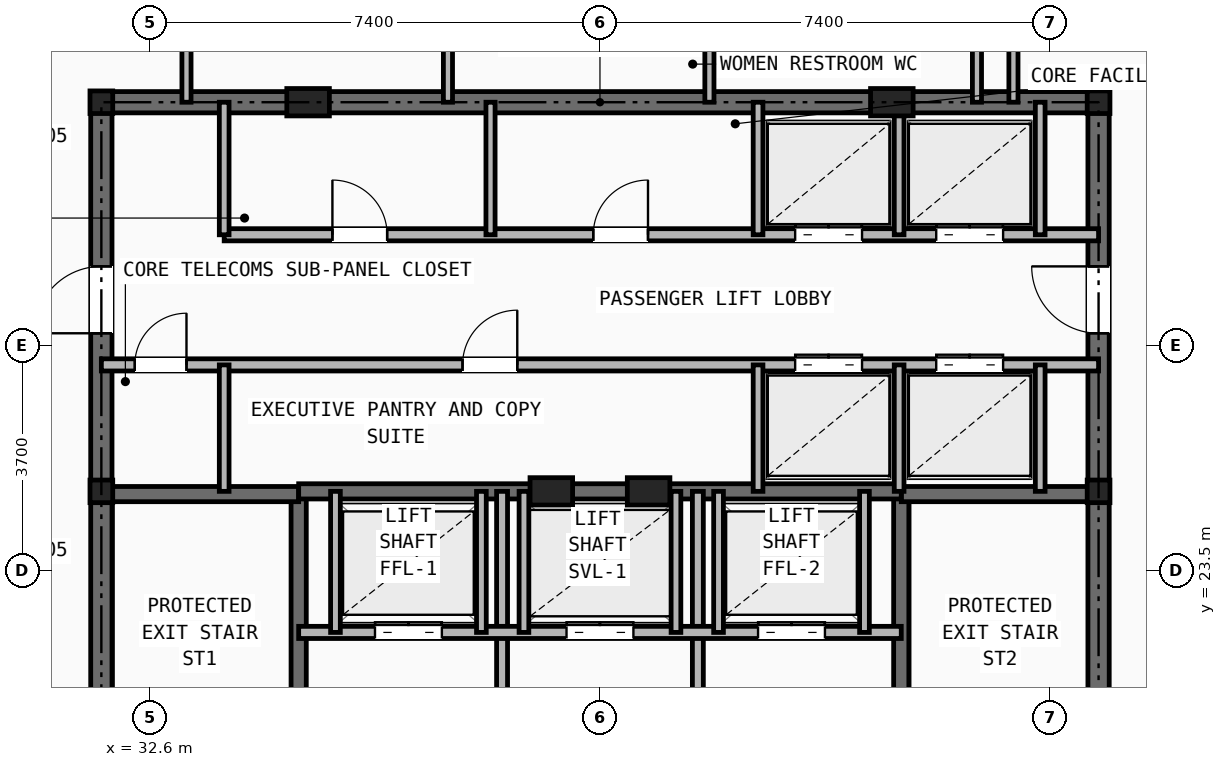
"""IFC4 building model, lengths in metres.
Left out: names, types, materials, properties, quantities, classifications, styles, units other than length and angle.
Written with IfcOpenShell. Run it as: python <this file> out.ifc"""

import sys

from ifc_helpers import new_model, si_unit, direction, frame, frame_2d, origin, origin_2d, place, context, subcontext, project, spatial, rectangle, i_section, extrude, element, fill, save


model = new_model("IFC4")
c1 = context("Model", 3, precision=1e-05, world=origin(), true_north=direction((0.0, 1.0)))
c2 = subcontext(c1, "Body", "Model", "MODEL_VIEW")
j1 = project(units=[si_unit("LENGTHUNIT", "METRE"), si_unit("PLANEANGLEUNIT", "RADIAN")], contexts=[c1])
p1 = place(None, origin())
s1 = spatial("IfcSite", under=j1, at=p1, CompositionType="ELEMENT")
p2 = place(p1, origin())
s2 = spatial("IfcBuilding", under=s1, at=p2, CompositionType="ELEMENT")
p3 = place(p2, frame((0.0, 0.0, 246.9)))
s3 = spatial("IfcBuildingStorey", under=s2, at=p3, CompositionType="ELEMENT", Elevation=246.9)
for number, where, z_axis, x_axis in (
    (1, (31.8, 24.8, 0.0), (0.0, 0.0, 1.0), (1.0, 0.0, 0.0)),
    (2, (48.2, 24.8, 0.0), (0.0, 0.0, 1.0), (1.0, 0.0, 0.0)),
    (3, (31.8, 31.2, 0.0), (0.0, 0.0, 1.0), (1.0, 0.0, 0.0)),
    (4, (48.2, 31.2, 0.0), (0.0, 0.0, 1.0), (1.0, 0.0, 0.0)),
):
    element("IfcColumn", number, at=place(p3, frame(where, z_axis=z_axis, x_axis=x_axis)), inside=s3, PredefinedType="COLUMN", context=c2, shape_type="SweptSolid", body=[
        extrude(i_section(OverallWidth=0.374, OverallDepth=0.372, WebThickness=0.016, FlangeThickness=0.026, at=origin_2d()), origin(), (0.0, 0.0, 1.0), 3.5),
    ])
for number, where, z_axis, x_axis in (
    (5, (35.2, 31.2, 0.0), (0.0, 0.0, 1.0), (1.0, 0.0, 0.0)),
    (6, (44.8, 31.2, 0.0), (0.0, 0.0, 1.0), (1.0, 0.0, 0.0)),
    (7, (39.2, 24.8, 0.0), (0.0, 0.0, 1.0), (1.0, 0.0, 0.0)),
    (8, (40.8, 24.8, 0.0), (0.0, 0.0, 1.0), (1.0, 0.0, 0.0)),
):
    element("IfcColumn", number, at=place(p3, frame(where, z_axis=z_axis, x_axis=x_axis)), inside=s3, PredefinedType="PILASTER", context=c2, shape_type="SweptSolid", body=[
        extrude(rectangle(XDim=0.7, YDim=0.45, at=origin_2d()), origin(), (0.0, 0.0, 1.0), 3.5),
    ])
p4 = place(p3, frame((31.8, 31.2, 0.0), z_axis=(0.0, 0.0, 1.0), x_axis=(1.0, 0.0, 0.0)))
e9 = element("IfcWall", 9, at=p4, inside=s3, PredefinedType="SHEAR", context=c2, shape_type="SweptSolid", body=[
    extrude(rectangle(XDim=16.4, YDim=0.35, at=frame_2d((8.2, 0.0))), origin(), (0.0, 0.0, 1.0), 3.2),
])
p5 = place(p3, frame((31.8, 16.4, 0.0), z_axis=(0.0, 0.0, 1.0), x_axis=(0.0, 1.0, 0.0)))
e10 = element("IfcWall", 10, at=p5, inside=s3, PredefinedType="SHEAR", context=c2, shape_type="SweptSolid", body=[
    extrude(rectangle(XDim=14.8, YDim=0.35, at=frame_2d((7.4, 0.0))), origin(), (0.0, 0.0, 1.0), 3.2),
])
p6 = place(p5, frame((11.0, 0.0, 0.0)))
e11 = element("IfcOpeningElement", 11, at=p6, cuts=e10, PredefinedType="OPENING", context=c2, shape_type="SweptSolid", body=[
    extrude(rectangle(XDim=1.1, YDim=2.15, at=frame_2d((0.55, 1.075))), frame((0.0, 0.185, 0.0), z_axis=(0.0, -1.0, 0.0), x_axis=(1.0, 0.0, 0.0)), (0.0, 0.0, 1.0), 0.37),
])
p7 = place(p3, frame((48.2, 16.4, 0.0), z_axis=(0.0, 0.0, 1.0), x_axis=(0.0, 1.0, 0.0)))
e12 = element("IfcWall", 12, at=p7, inside=s3, PredefinedType="SHEAR", context=c2, shape_type="SweptSolid", body=[
    extrude(rectangle(XDim=14.8, YDim=0.35, at=frame_2d((7.4, 0.0))), origin(), (0.0, 0.0, 1.0), 3.2),
])
p8 = place(p7, frame((11.0, 0.0, 0.0)))
e13 = element("IfcOpeningElement", 13, at=p8, cuts=e12, PredefinedType="OPENING", context=c2, shape_type="SweptSolid", body=[
    extrude(rectangle(XDim=1.1, YDim=2.15, at=frame_2d((0.55, 1.075))), frame((0.0, 0.185, 0.0), z_axis=(0.0, -1.0, 0.0), x_axis=(1.0, 0.0, 0.0)), (0.0, 0.0, 1.0), 0.37),
])
p9 = place(p3, frame((35.045, 16.4, 0.0), z_axis=(0.0, 0.0, 1.0), x_axis=(0.0, 1.0, 0.0)))
e14 = element("IfcWall", 14, at=p9, inside=s3, PredefinedType="SHEAR", context=c2, shape_type="SweptSolid", body=[
    extrude(rectangle(XDim=8.4, YDim=0.25, at=frame_2d((4.2, 0.0))), origin(), (0.0, 0.0, 1.0), 3.2),
])
p10 = place(p9, frame((0.45, 0.0, 0.0)))
e15 = element("IfcOpeningElement", 15, at=p10, cuts=e14, PredefinedType="OPENING", context=c2, shape_type="SweptSolid", body=[
    extrude(rectangle(XDim=0.95, YDim=2.1, at=frame_2d((0.475, 1.05))), frame((0.0, 0.135, 0.0), z_axis=(0.0, -1.0, 0.0), x_axis=(1.0, 0.0, 0.0)), (0.0, 0.0, 1.0), 0.27),
])
p11 = place(p3, frame((31.8, 24.755, 0.0), z_axis=(0.0, 0.0, 1.0), x_axis=(1.0, 0.0, 0.0)))
e16 = element("IfcWall", 16, at=p11, inside=s3, PredefinedType="SHEAR", context=c2, shape_type="SweptSolid", body=[
    extrude(rectangle(XDim=3.245, YDim=0.25, at=frame_2d((1.623, 0.0))), origin(), (0.0, 0.0, 1.0), 3.2),
])
p12 = place(p3, frame((44.955, 16.4, 0.0), z_axis=(0.0, 0.0, 1.0), x_axis=(0.0, 1.0, 0.0)))
e17 = element("IfcWall", 17, at=p12, inside=s3, PredefinedType="SHEAR", context=c2, shape_type="SweptSolid", body=[
    extrude(rectangle(XDim=8.4, YDim=0.25, at=frame_2d((4.2, 0.0))), origin(), (0.0, 0.0, 1.0), 3.2),
])
p13 = place(p12, frame((0.45, 0.0, 0.0)))
e18 = element("IfcOpeningElement", 18, at=p13, cuts=e17, PredefinedType="OPENING", context=c2, shape_type="SweptSolid", body=[
    extrude(rectangle(XDim=0.95, YDim=2.1, at=frame_2d((0.475, 1.05))), frame((0.0, 0.135, 0.0), z_axis=(0.0, -1.0, 0.0), x_axis=(1.0, 0.0, 0.0)), (0.0, 0.0, 1.0), 0.27),
])
p14 = place(p3, frame((44.955, 24.755, 0.0), z_axis=(0.0, 0.0, 1.0), x_axis=(1.0, 0.0, 0.0)))
e19 = element("IfcWall", 19, at=p14, inside=s3, PredefinedType="SHEAR", context=c2, shape_type="SweptSolid", body=[
    extrude(rectangle(XDim=3.245, YDim=0.25, at=frame_2d((1.623, 0.0))), origin(), (0.0, 0.0, 1.0), 3.2),
])
p15 = place(p3, frame((35.045, 24.8, 0.0), z_axis=(0.0, 0.0, 1.0), x_axis=(1.0, 0.0, 0.0)))
e20 = element("IfcWall", 20, at=p15, inside=s3, PredefinedType="SHEAR", context=c2, shape_type="SweptSolid", body=[
    extrude(rectangle(XDim=9.91, YDim=0.25, at=frame_2d((4.955, 0.0))), origin(), (0.0, 0.0, 1.0), 3.2),
])
p16 = place(p3, frame((38.39, 16.4, 0.0), z_axis=(0.0, 0.0, 1.0), x_axis=(0.0, 1.0, 0.0)))
e21 = element("IfcWall", 21, at=p16, inside=s3, PredefinedType="PARTITIONING", context=c2, shape_type="SweptSolid", body=[
    extrude(rectangle(XDim=8.4, YDim=0.18, at=frame_2d((4.2, 0.0))), origin(), (0.0, 0.0, 1.0), 2.928),
])
p17 = place(p16, frame((3.85, 0.0, 0.0)))
e22 = element("IfcOpeningElement", 22, at=p17, cuts=e21, PredefinedType="OPENING", context=c2, shape_type="SweptSolid", body=[
    extrude(rectangle(XDim=0.95, YDim=2.1, at=frame_2d((0.475, 1.05))), frame((0.0, 0.1, 0.0), z_axis=(0.0, -1.0, 0.0), x_axis=(1.0, 0.0, 0.0)), (0.0, 0.0, 1.0), 0.2),
])
p18 = place(p3, frame((41.61, 16.4, 0.0), z_axis=(0.0, 0.0, 1.0), x_axis=(0.0, 1.0, 0.0)))
e23 = element("IfcWall", 23, at=p18, inside=s3, PredefinedType="PARTITIONING", context=c2, shape_type="SweptSolid", body=[
    extrude(rectangle(XDim=8.4, YDim=0.18, at=frame_2d((4.2, 0.0))), origin(), (0.0, 0.0, 1.0), 2.928),
])
p19 = place(p3, frame((35.045, 22.48, 0.0), z_axis=(0.0, 0.0, 1.0), x_axis=(1.0, 0.0, 0.0)))
e24 = element("IfcWall", 24, at=p19, inside=s3, PredefinedType="SOLIDWALL", context=c2, shape_type="SweptSolid", body=[
    extrude(rectangle(XDim=9.91, YDim=0.2, at=frame_2d((4.955, 0.0))), origin(), (0.0, 0.0, 1.0), 3.2),
])
p20 = place(p19, frame((1.255, 0.0, 0.0)))
e25 = element("IfcOpeningElement", 25, at=p20, cuts=e24, PredefinedType="OPENING", context=c2, shape_type="SweptSolid", body=[
    extrude(rectangle(XDim=1.1, YDim=2.15, at=frame_2d((0.55, 1.075))), frame((0.0, 0.11, 0.0), z_axis=(0.0, -1.0, 0.0), x_axis=(1.0, 0.0, 0.0)), (0.0, 0.0, 1.0), 0.22),
])
p21 = place(p19, frame((7.555, 0.0, 0.0)))
e26 = element("IfcOpeningElement", 26, at=p21, cuts=e24, PredefinedType="OPENING", context=c2, shape_type="SweptSolid", body=[
    extrude(rectangle(XDim=1.1, YDim=2.15, at=frame_2d((0.55, 1.075))), frame((0.0, 0.11, 0.0), z_axis=(0.0, -1.0, 0.0), x_axis=(1.0, 0.0, 0.0)), (0.0, 0.0, 1.0), 0.22),
])
p22 = place(p19, frame((4.405, 0.0, 0.0)))
e27 = element("IfcOpeningElement", 27, at=p22, cuts=e24, PredefinedType="OPENING", context=c2, shape_type="SweptSolid", body=[
    extrude(rectangle(XDim=1.1, YDim=2.15, at=frame_2d((0.55, 1.075))), frame((0.0, 0.11, 0.0), z_axis=(0.0, -1.0, 0.0), x_axis=(1.0, 0.0, 0.0)), (0.0, 0.0, 1.0), 0.22),
])
for number, where, z_axis, x_axis in (
    (28, (35.65, 22.48, 0.0), (0.0, 0.0, 1.0), (0.0, 1.0, 0.0)),
    (29, (38.05, 22.48, 0.0), (0.0, 0.0, 1.0), (0.0, 1.0, 0.0)),
    (30, (41.95, 22.48, 0.0), (0.0, 0.0, 1.0), (0.0, 1.0, 0.0)),
    (31, (44.35, 22.48, 0.0), (0.0, 0.0, 1.0), (0.0, 1.0, 0.0)),
    (32, (38.75, 22.48, 0.0), (0.0, 0.0, 1.0), (0.0, 1.0, 0.0)),
    (33, (41.25, 22.48, 0.0), (0.0, 0.0, 1.0), (0.0, 1.0, 0.0)),
):
    element("IfcWall", number, at=place(p3, frame(where, z_axis=z_axis, x_axis=x_axis)), inside=s3, PredefinedType="SOLIDWALL", context=c2, shape_type="SweptSolid", body=[
        extrude(rectangle(XDim=2.32, YDim=0.16, at=frame_2d((1.16, 0.0))), origin(), (0.0, 0.0, 1.0), 3.2),
    ])
p23 = place(p3, frame((33.82, 29.02, 0.0), z_axis=(0.0, 0.0, 1.0), x_axis=(1.0, 0.0, 0.0)))
e34 = element("IfcWall", 34, at=p23, inside=s3, PredefinedType="SOLIDWALL", context=c2, shape_type="SweptSolid", body=[
    extrude(rectangle(XDim=14.38, YDim=0.2, at=frame_2d((7.19, 0.0))), origin(), (0.0, 0.0, 1.0), 2.655),
])
p24 = place(p23, frame((1.78, 0.0, 0.0)))
e35 = element("IfcOpeningElement", 35, at=p24, cuts=e34, PredefinedType="OPENING", context=c2, shape_type="SweptSolid", body=[
    extrude(rectangle(XDim=0.9, YDim=2.1, at=frame_2d((0.45, 1.05))), frame((0.0, 0.11, 0.0), z_axis=(0.0, -1.0, 0.0), x_axis=(1.0, 0.0, 0.0)), (0.0, 0.0, 1.0), 0.22),
])
p25 = place(p23, frame((6.07, 0.0, 0.0)))
e36 = element("IfcOpeningElement", 36, at=p25, cuts=e34, PredefinedType="OPENING", context=c2, shape_type="SweptSolid", body=[
    extrude(rectangle(XDim=0.9, YDim=2.1, at=frame_2d((0.45, 1.05))), frame((0.0, 0.11, 0.0), z_axis=(0.0, -1.0, 0.0), x_axis=(1.0, 0.0, 0.0)), (0.0, 0.0, 1.0), 0.22),
])
p26 = place(p23, frame((9.39, 0.0, 0.0)))
e37 = element("IfcOpeningElement", 37, at=p26, cuts=e34, PredefinedType="OPENING", context=c2, shape_type="SweptSolid", body=[
    extrude(rectangle(XDim=1.1, YDim=2.15, at=frame_2d((0.55, 1.075))), frame((0.0, 0.11, 0.0), z_axis=(0.0, -1.0, 0.0), x_axis=(1.0, 0.0, 0.0)), (0.0, 0.0, 1.0), 0.22),
])
p27 = place(p23, frame((11.71, 0.0, 0.0)))
e38 = element("IfcOpeningElement", 38, at=p27, cuts=e34, PredefinedType="OPENING", context=c2, shape_type="SweptSolid", body=[
    extrude(rectangle(XDim=1.1, YDim=2.15, at=frame_2d((0.55, 1.075))), frame((0.0, 0.11, 0.0), z_axis=(0.0, -1.0, 0.0), x_axis=(1.0, 0.0, 0.0)), (0.0, 0.0, 1.0), 0.22),
])
p28 = place(p3, frame((31.8, 26.88, 0.0), z_axis=(0.0, 0.0, 1.0), x_axis=(1.0, 0.0, 0.0)))
e39 = element("IfcWall", 39, at=p28, inside=s3, PredefinedType="SOLIDWALL", context=c2, shape_type="SweptSolid", body=[
    extrude(rectangle(XDim=16.4, YDim=0.2, at=frame_2d((8.2, 0.0))), origin(), (0.0, 0.0, 1.0), 2.655),
])
p29 = place(p28, frame((0.55, 0.0, 0.0)))
e40 = element("IfcOpeningElement", 40, at=p29, cuts=e39, PredefinedType="OPENING", context=c2, shape_type="SweptSolid", body=[
    extrude(rectangle(XDim=0.85, YDim=2.05, at=frame_2d((0.425, 1.025))), frame((0.0, 0.11, 0.0), z_axis=(0.0, -1.0, 0.0), x_axis=(1.0, 0.0, 0.0)), (0.0, 0.0, 1.0), 0.22),
])
p30 = place(p28, frame((5.94, 0.0, 0.0)))
e41 = element("IfcOpeningElement", 41, at=p30, cuts=e39, PredefinedType="OPENING", context=c2, shape_type="SweptSolid", body=[
    extrude(rectangle(XDim=0.9, YDim=2.1, at=frame_2d((0.45, 1.05))), frame((0.0, 0.11, 0.0), z_axis=(0.0, -1.0, 0.0), x_axis=(1.0, 0.0, 0.0)), (0.0, 0.0, 1.0), 0.22),
])
p31 = place(p28, frame((11.41, 0.0, 0.0)))
e42 = element("IfcOpeningElement", 42, at=p31, cuts=e39, PredefinedType="OPENING", context=c2, shape_type="SweptSolid", body=[
    extrude(rectangle(XDim=1.1, YDim=2.15, at=frame_2d((0.55, 1.075))), frame((0.0, 0.11, 0.0), z_axis=(0.0, -1.0, 0.0), x_axis=(1.0, 0.0, 0.0)), (0.0, 0.0, 1.0), 0.22),
])
p32 = place(p28, frame((13.73, 0.0, 0.0)))
e43 = element("IfcOpeningElement", 43, at=p32, cuts=e39, PredefinedType="OPENING", context=c2, shape_type="SweptSolid", body=[
    extrude(rectangle(XDim=1.1, YDim=2.15, at=frame_2d((0.55, 1.075))), frame((0.0, 0.11, 0.0), z_axis=(0.0, -1.0, 0.0), x_axis=(1.0, 0.0, 0.0)), (0.0, 0.0, 1.0), 0.22),
])
p33 = place(p3, frame((33.82, 29.02, 0.0), z_axis=(0.0, 0.0, 1.0), x_axis=(0.0, 1.0, 0.0)))
e44 = element("IfcWall", 44, at=p33, inside=s3, PredefinedType="SOLIDWALL", context=c2, shape_type="SweptSolid", body=[
    extrude(rectangle(XDim=2.18, YDim=0.16, at=frame_2d((1.09, 0.0))), origin(), (0.0, 0.0, 1.0), 2.928),
])
p34 = place(p3, frame((33.82, 24.8, 0.0), z_axis=(0.0, 0.0, 1.0), x_axis=(0.0, 1.0, 0.0)))
e45 = element("IfcWall", 45, at=p34, inside=s3, PredefinedType="SOLIDWALL", context=c2, shape_type="SweptSolid", body=[
    extrude(rectangle(XDim=2.08, YDim=0.16, at=frame_2d((1.04, 0.0))), origin(), (0.0, 0.0, 1.0), 3.2),
])
p35 = place(p3, frame((38.2, 29.02, 0.0), z_axis=(0.0, 0.0, 1.0), x_axis=(0.0, 1.0, 0.0)))
e46 = element("IfcWall", 46, at=p35, inside=s3, PredefinedType="PARTITIONING", context=c2, shape_type="SweptSolid", body=[
    extrude(rectangle(XDim=2.18, YDim=0.15, at=frame_2d((1.09, 0.0))), origin(), (0.0, 0.0, 1.0), 2.928),
])
for number, where, z_axis, x_axis in (
    (47, (42.6, 29.02, 0.0), (0.0, 0.0, 1.0), (0.0, 1.0, 0.0)),
    (48, (44.92, 29.02, 0.0), (0.0, 0.0, 1.0), (0.0, 1.0, 0.0)),
    (49, (47.24, 29.02, 0.0), (0.0, 0.0, 1.0), (0.0, 1.0, 0.0)),
):
    element("IfcWall", number, at=place(p3, frame(where, z_axis=z_axis, x_axis=x_axis)), inside=s3, PredefinedType="SOLIDWALL", context=c2, shape_type="SweptSolid", body=[
        extrude(rectangle(XDim=2.18, YDim=0.16, at=frame_2d((1.09, 0.0))), origin(), (0.0, 0.0, 1.0), 2.928),
    ])
for number, where, z_axis, x_axis in (
    (50, (42.6, 24.8, 0.0), (0.0, 0.0, 1.0), (0.0, 1.0, 0.0)),
    (51, (44.92, 24.8, 0.0), (0.0, 0.0, 1.0), (0.0, 1.0, 0.0)),
    (52, (47.24, 24.8, 0.0), (0.0, 0.0, 1.0), (0.0, 1.0, 0.0)),
):
    element("IfcWall", number, at=place(p3, frame(where, z_axis=z_axis, x_axis=x_axis)), inside=s3, PredefinedType="SOLIDWALL", context=c2, shape_type="SweptSolid", body=[
        extrude(rectangle(XDim=2.08, YDim=0.16, at=frame_2d((1.04, 0.0))), origin(), (0.0, 0.0, 1.0), 3.2),
    ])
for number, where, z_axis, x_axis in (
    (53, (33.2, 31.2, 0.0), (0.0, 0.0, 1.0), (0.0, 1.0, 0.0)),
    (54, (46.2, 31.2, 0.0), (0.0, 0.0, 1.0), (0.0, 1.0, 0.0)),
    (55, (37.5, 31.2, 0.0), (0.0, 0.0, 1.0), (0.0, 1.0, 0.0)),
    (56, (41.8, 31.2, 0.0), (0.0, 0.0, 1.0), (0.0, 1.0, 0.0)),
):
    element("IfcWall", number, at=place(p3, frame(where, z_axis=z_axis, x_axis=x_axis)), inside=s3, PredefinedType="PARTITIONING", context=c2, shape_type="SweptSolid", body=[
        extrude(rectangle(XDim=2.6, YDim=0.15, at=frame_2d((1.3, 0.0))), origin(), (0.0, 0.0, 1.0), 2.928),
    ])
p36 = place(p3, frame((46.8, 31.2, 0.0), z_axis=(0.0, 0.0, 1.0), x_axis=(0.0, 1.0, 0.0)))
e57 = element("IfcWall", 57, at=p36, inside=s3, PredefinedType="PARTITIONING", context=c2, shape_type="SweptSolid", body=[
    extrude(rectangle(XDim=4.5, YDim=0.15, at=frame_2d((2.25, 0.0))), origin(), (0.0, 0.0, 1.0), 2.928),
])
p37 = place(p20, origin())
e58 = element("IfcDoor", 58, at=p37, inside=s3, OperationType="DOUBLE_DOOR_SLIDING", PredefinedType="DOOR", context=c2, shape_type="SweptSolid", body=[
    extrude(rectangle(XDim=1.1, YDim=2.15, at=frame_2d((0.55, 1.075))), frame((0.0, 0.025, 0.0), z_axis=(0.0, -1.0, 0.0), x_axis=(1.0, 0.0, 0.0)), (0.0, 0.0, 1.0), 0.05),
])
fill(e25, e58)
p38 = place(p21, origin())
e59 = element("IfcDoor", 59, at=p38, inside=s3, OperationType="DOUBLE_DOOR_SLIDING", PredefinedType="DOOR", context=c2, shape_type="SweptSolid", body=[
    extrude(rectangle(XDim=1.1, YDim=2.15, at=frame_2d((0.55, 1.075))), frame((0.0, 0.025, 0.0), z_axis=(0.0, -1.0, 0.0), x_axis=(1.0, 0.0, 0.0)), (0.0, 0.0, 1.0), 0.05),
])
fill(e26, e59)
p39 = place(p22, origin())
e60 = element("IfcDoor", 60, at=p39, inside=s3, OperationType="DOUBLE_DOOR_SLIDING", PredefinedType="DOOR", context=c2, shape_type="SweptSolid", body=[
    extrude(rectangle(XDim=1.1, YDim=2.15, at=frame_2d((0.55, 1.075))), frame((0.0, 0.025, 0.0), z_axis=(0.0, -1.0, 0.0), x_axis=(1.0, 0.0, 0.0)), (0.0, 0.0, 1.0), 0.05),
])
fill(e27, e60)
p40 = place(p29, origin())
e61 = element("IfcDoor", 61, at=p40, inside=s3, OperationType="SINGLE_SWING_RIGHT", PredefinedType="DOOR", context=c2, shape_type="SweptSolid", body=[
    extrude(rectangle(XDim=0.85, YDim=2.05, at=frame_2d((0.425, 1.025))), frame((0.0, 0.025, 0.0), z_axis=(0.0, -1.0, 0.0), x_axis=(1.0, 0.0, 0.0)), (0.0, 0.0, 1.0), 0.05),
])
fill(e40, e61)
p41 = place(p6, origin())
e62 = element("IfcDoor", 62, at=p41, inside=s3, OperationType="SINGLE_SWING_LEFT", PredefinedType="DOOR", context=c2, shape_type="SweptSolid", body=[
    extrude(rectangle(XDim=1.1, YDim=2.15, at=frame_2d((0.55, 1.075))), frame((0.0, 0.025, 0.0), z_axis=(0.0, -1.0, 0.0), x_axis=(1.0, 0.0, 0.0)), (0.0, 0.0, 1.0), 0.05),
])
fill(e11, e62)
p42 = place(p8, origin())
e63 = element("IfcDoor", 63, at=p42, inside=s3, OperationType="SINGLE_SWING_RIGHT", PredefinedType="DOOR", context=c2, shape_type="SweptSolid", body=[
    extrude(rectangle(XDim=1.1, YDim=2.15, at=frame_2d((0.55, 1.075))), frame((0.0, 0.025, 0.0), z_axis=(0.0, -1.0, 0.0), x_axis=(1.0, 0.0, 0.0)), (0.0, 0.0, 1.0), 0.05),
])
fill(e13, e63)
p43 = place(p24, origin())
e64 = element("IfcDoor", 64, at=p43, inside=s3, OperationType="SINGLE_SWING_LEFT", PredefinedType="DOOR", context=c2, shape_type="SweptSolid", body=[
    extrude(rectangle(XDim=0.9, YDim=2.1, at=frame_2d((0.45, 1.05))), frame((0.0, 0.025, 0.0), z_axis=(0.0, -1.0, 0.0), x_axis=(1.0, 0.0, 0.0)), (0.0, 0.0, 1.0), 0.05),
])
fill(e35, e64)
p44 = place(p25, origin())
e65 = element("IfcDoor", 65, at=p44, inside=s3, OperationType="SINGLE_SWING_RIGHT", PredefinedType="DOOR", context=c2, shape_type="SweptSolid", body=[
    extrude(rectangle(XDim=0.9, YDim=2.1, at=frame_2d((0.45, 1.05))), frame((0.0, 0.025, 0.0), z_axis=(0.0, -1.0, 0.0), x_axis=(1.0, 0.0, 0.0)), (0.0, 0.0, 1.0), 0.05),
])
fill(e36, e65)
p45 = place(p30, origin())
e66 = element("IfcDoor", 66, at=p45, inside=s3, OperationType="SINGLE_SWING_RIGHT", PredefinedType="DOOR", context=c2, shape_type="SweptSolid", body=[
    extrude(rectangle(XDim=0.9, YDim=2.1, at=frame_2d((0.45, 1.05))), frame((0.0, 0.025, 0.0), z_axis=(0.0, -1.0, 0.0), x_axis=(1.0, 0.0, 0.0)), (0.0, 0.0, 1.0), 0.05),
])
fill(e41, e66)
p46 = place(p26, origin())
e67 = element("IfcDoor", 67, at=p46, inside=s3, OperationType="DOUBLE_DOOR_SLIDING", PredefinedType="DOOR", context=c2, shape_type="SweptSolid", body=[
    extrude(rectangle(XDim=1.1, YDim=2.15, at=frame_2d((0.55, 1.075))), frame((0.0, 0.025, 0.0), z_axis=(0.0, -1.0, 0.0), x_axis=(1.0, 0.0, 0.0)), (0.0, 0.0, 1.0), 0.05),
])
fill(e37, e67)
p47 = place(p27, origin())
e68 = element("IfcDoor", 68, at=p47, inside=s3, OperationType="DOUBLE_DOOR_SLIDING", PredefinedType="DOOR", context=c2, shape_type="SweptSolid", body=[
    extrude(rectangle(XDim=1.1, YDim=2.15, at=frame_2d((0.55, 1.075))), frame((0.0, 0.025, 0.0), z_axis=(0.0, -1.0, 0.0), x_axis=(1.0, 0.0, 0.0)), (0.0, 0.0, 1.0), 0.05),
])
fill(e38, e68)
p48 = place(p31, origin())
e69 = element("IfcDoor", 69, at=p48, inside=s3, OperationType="DOUBLE_DOOR_SLIDING", PredefinedType="DOOR", context=c2, shape_type="SweptSolid", body=[
    extrude(rectangle(XDim=1.1, YDim=2.15, at=frame_2d((0.55, 1.075))), frame((0.0, 0.025, 0.0), z_axis=(0.0, -1.0, 0.0), x_axis=(1.0, 0.0, 0.0)), (0.0, 0.0, 1.0), 0.05),
])
fill(e42, e69)
p49 = place(p32, origin())
e70 = element("IfcDoor", 70, at=p49, inside=s3, OperationType="DOUBLE_DOOR_SLIDING", PredefinedType="DOOR", context=c2, shape_type="SweptSolid", body=[
    extrude(rectangle(XDim=1.1, YDim=2.15, at=frame_2d((0.55, 1.075))), frame((0.0, 0.025, 0.0), z_axis=(0.0, -1.0, 0.0), x_axis=(1.0, 0.0, 0.0)), (0.0, 0.0, 1.0), 0.05),
])
fill(e43, e70)
save(model, sys.argv[1])
